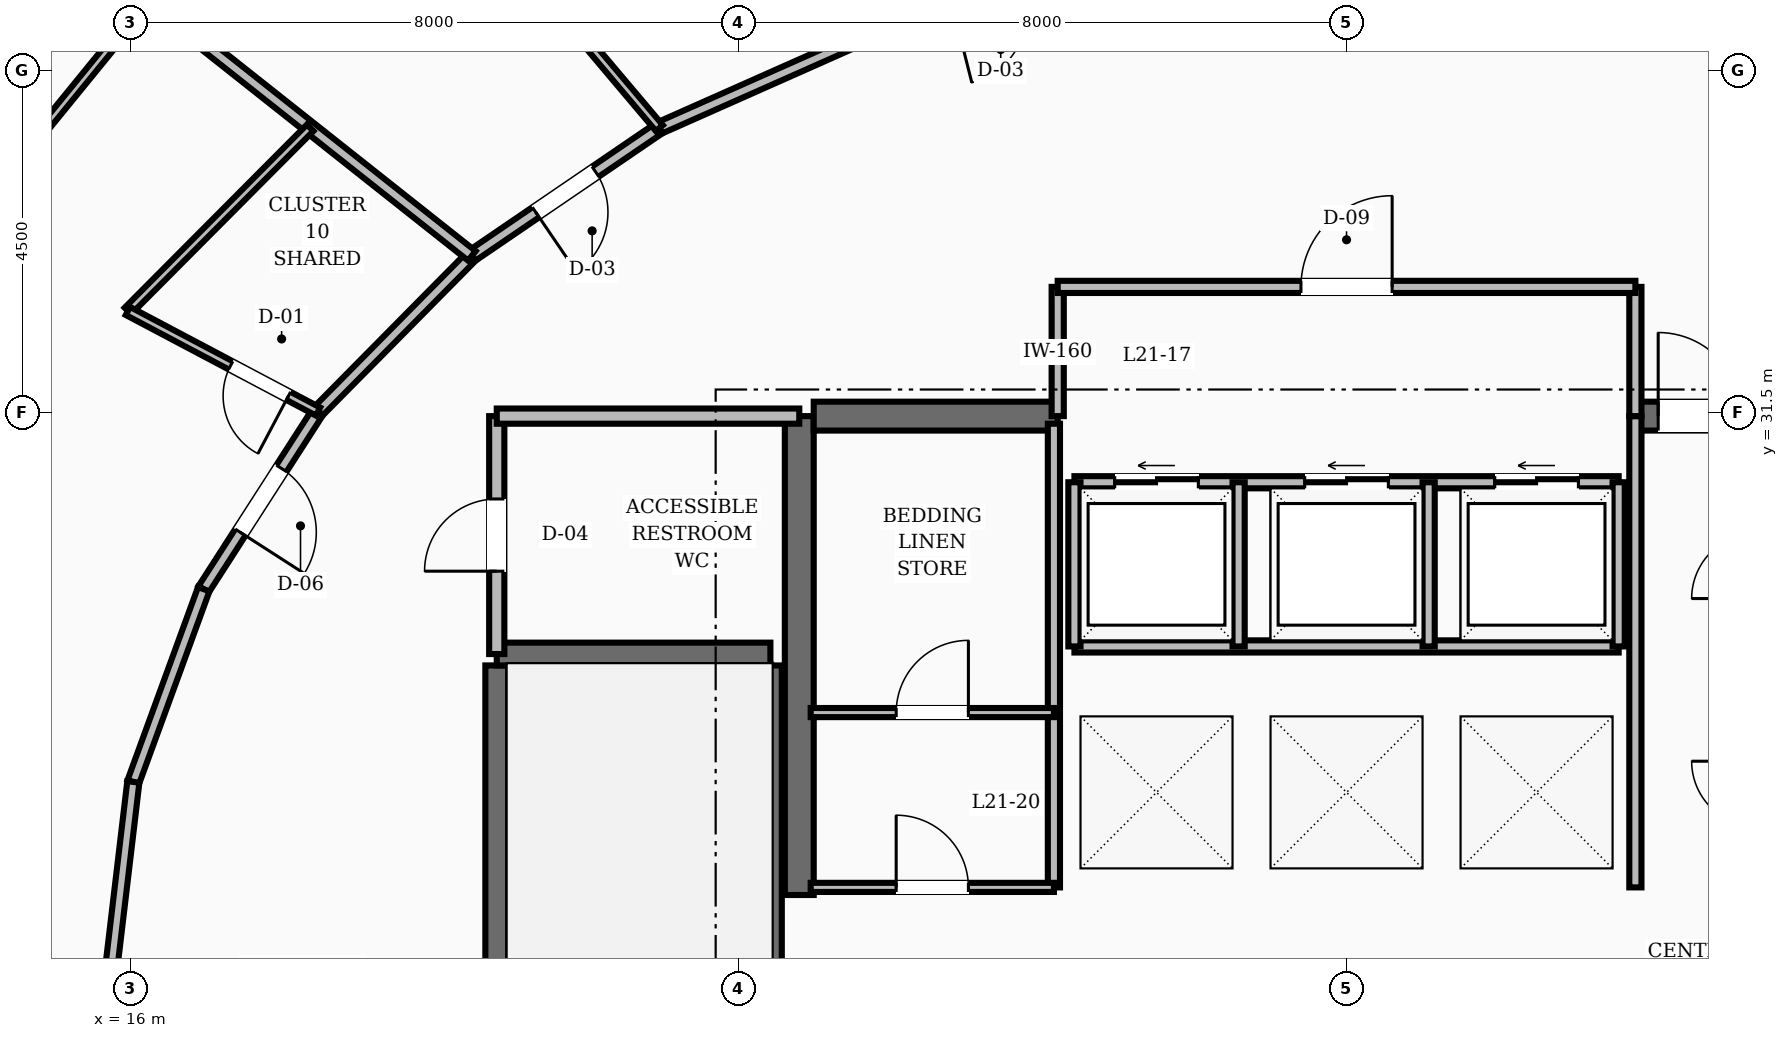
"""IFC4 building model, lengths in metres.
Left out: names, types, materials, properties, quantities, classifications, styles, units other than length and angle.
Written with IfcOpenShell. Run it as: python <this file> out.ifc"""

import sys

from ifc_helpers import new_model, si_unit, direction, frame, frame_2d, origin, place, context, subcontext, project, spatial, rectangle, extrude, element, fill, save


model = new_model("IFC4")
c1 = context("Model", 3, precision=1e-05, world=origin(), true_north=direction((0.0, 1.0)))
c2 = subcontext(c1, "Body", "Model", "MODEL_VIEW")
j1 = project(units=[si_unit("LENGTHUNIT", "METRE"), si_unit("PLANEANGLEUNIT", "RADIAN")], contexts=[c1])
p1 = place(None, origin())
s1 = spatial("IfcSite", under=j1, at=p1, CompositionType="ELEMENT")
p2 = place(p1, origin())
s2 = spatial("IfcBuilding", under=s1, at=p2, CompositionType="ELEMENT")
p3 = place(p2, frame((0.0, 0.0, 84.4)))
s3 = spatial("IfcBuildingStorey", under=s2, at=p3, CompositionType="ELEMENT", Elevation=84.4)
p4 = place(p3, frame((24.8, 25.15, 0.0), z_axis=(0.0, 0.0, 1.0), x_axis=(0.0, 1.0, 0.0)))
e1 = element("IfcWall", 1, at=p4, inside=s3, PredefinedType="SHEAR", context=c2, shape_type="SweptSolid", body=[
    extrude(rectangle(XDim=6.3, YDim=0.38, at=frame_2d((3.15, 0.0))), origin(), (0.0, 0.0, 1.0), 3.6),
])
p5 = place(p3, frame((24.99, 31.45, 0.0), z_axis=(0.0, 0.0, 1.0), x_axis=(1.0, 0.0, 0.0)))
e2 = element("IfcWall", 2, at=p5, inside=s3, PredefinedType="SHEAR", context=c2, shape_type="SweptSolid", body=[
    extrude(rectangle(XDim=3.21, YDim=0.38, at=frame_2d((1.605, 0.0))), origin(), (0.0, 0.0, 1.0), 3.6),
])
p6 = place(p3, frame((35.8, 31.45, 0.0), z_axis=(0.0, 0.0, 1.0), x_axis=(1.0, 0.0, 0.0)))
e3 = element("IfcWall", 3, at=p6, inside=s3, PredefinedType="SHEAR", context=c2, shape_type="SweptSolid", body=[
    extrude(rectangle(XDim=3.21, YDim=0.38, at=frame_2d((1.605, 0.0))), origin(), (0.0, 0.0, 1.0), 3.6),
])
p7 = place(p6, frame((0.3, 0.0, 0.0)))
e4 = element("IfcOpeningElement", 4, at=p7, cuts=e3, PredefinedType="OPENING", context=c2, shape_type="SweptSolid", body=[
    extrude(rectangle(XDim=1.1, YDim=2.1, at=frame_2d((0.55, 1.05))), frame((0.0, 0.2, 0.0), z_axis=(0.0, -1.0, 0.0), x_axis=(1.0, 0.0, 0.0)), (0.0, 0.0, 1.0), 0.4),
])
for number, where, z_axis, x_axis in (
    (5, (20.82, 19.43, 0.0), (0.0, 0.0, 1.0), (0.0, 1.0, 0.0)),
    (6, (24.42, 19.43, 0.0), (0.0, 0.0, 1.0), (0.0, 1.0, 0.0)),
):
    element("IfcWall", number, at=place(p3, frame(where, z_axis=z_axis, x_axis=x_axis)), inside=s3, PredefinedType="SHEAR", context=c2, shape_type="SweptSolid", body=[
        extrude(rectangle(XDim=8.74, YDim=0.3, at=frame_2d((4.37, 0.0))), origin(), (0.0, 0.0, 1.0), 3.6),
    ])
p8 = place(p3, frame((20.82, 28.32, 0.0), z_axis=(0.0, 0.0, 1.0), x_axis=(1.0, 0.0, 0.0)))
e7 = element("IfcWall", 7, at=p8, inside=s3, PredefinedType="SHEAR", context=c2, shape_type="SweptSolid", body=[
    extrude(rectangle(XDim=3.6, YDim=0.3, at=frame_2d((1.8, 0.0))), origin(), (0.0, 0.0, 1.0), 3.6),
])
p9 = place(p3, frame((20.82, 28.32, 0.0), z_axis=(0.0, 0.0, 1.0), x_axis=(0.0, 1.0, 0.0)))
e8 = element("IfcWall", 8, at=p9, inside=s3, PredefinedType="SOLIDWALL", context=c2, shape_type="SweptSolid", body=[
    extrude(rectangle(XDim=3.13, YDim=0.2, at=frame_2d((1.565, 0.0))), origin(), (0.0, 0.0, 1.0), 2.71),
])
p10 = place(p9, frame((1.09, 0.0, 0.0)))
e9 = element("IfcOpeningElement", 9, at=p10, cuts=e8, PredefinedType="OPENING", context=c2, shape_type="SweptSolid", body=[
    extrude(rectangle(XDim=0.95, YDim=2.1, at=frame_2d((0.475, 1.05))), frame((0.0, 0.11, 0.0), z_axis=(0.0, -1.0, 0.0), x_axis=(1.0, 0.0, 0.0)), (0.0, 0.0, 1.0), 0.22),
])
p11 = place(p3, frame((20.82, 31.45, 0.0), z_axis=(0.0, 0.0, 1.0), x_axis=(1.0, 0.0, 0.0)))
e10 = element("IfcWall", 10, at=p11, inside=s3, PredefinedType="SOLIDWALL", context=c2, shape_type="SweptSolid", body=[
    extrude(rectangle(XDim=3.98, YDim=0.2, at=frame_2d((1.99, 0.0))), origin(), (0.0, 0.0, 1.0), 2.71),
])
p12 = place(p3, frame((35.8, 25.25, 0.0), z_axis=(0.0, 0.0, 1.0), x_axis=(0.0, 1.0, 0.0)))
e11 = element("IfcWall", 11, at=p12, inside=s3, PredefinedType="SOLIDWALL", context=c2, shape_type="SweptSolid", body=[
    extrude(rectangle(XDim=6.2, YDim=0.16, at=frame_2d((3.1, 0.0))), origin(), (0.0, 0.0, 1.0), 2.71),
])
p13 = place(p3, frame((28.42, 30.58, 0.0), z_axis=(0.0, 0.0, 1.0), x_axis=(1.0, 0.0, 0.0)))
e12 = element("IfcWall", 12, at=p13, inside=s3, PredefinedType="SOLIDWALL", context=c2, shape_type="SweptSolid", body=[
    extrude(rectangle(XDim=7.16, YDim=0.16, at=frame_2d((3.58, 0.0))), origin(), (0.0, 0.0, 1.0), 2.71),
])
p14 = place(p13, frame((0.53, 0.0, 0.0)))
e13 = element("IfcOpeningElement", 13, at=p14, cuts=e12, PredefinedType="OPENING", context=c2, shape_type="SweptSolid", body=[
    extrude(rectangle(XDim=1.1, YDim=2.15, at=frame_2d((0.55, 1.075))), frame((0.0, 0.09, 0.0), z_axis=(0.0, -1.0, 0.0), x_axis=(1.0, 0.0, 0.0)), (0.0, 0.0, 1.0), 0.18),
])
p15 = place(p13, frame((3.03, 0.0, 0.0)))
e14 = element("IfcOpeningElement", 14, at=p15, cuts=e12, PredefinedType="OPENING", context=c2, shape_type="SweptSolid", body=[
    extrude(rectangle(XDim=1.1, YDim=2.15, at=frame_2d((0.55, 1.075))), frame((0.0, 0.09, 0.0), z_axis=(0.0, -1.0, 0.0), x_axis=(1.0, 0.0, 0.0)), (0.0, 0.0, 1.0), 0.18),
])
p16 = place(p13, frame((5.53, 0.0, 0.0)))
e15 = element("IfcOpeningElement", 15, at=p16, cuts=e12, PredefinedType="OPENING", context=c2, shape_type="SweptSolid", body=[
    extrude(rectangle(XDim=1.1, YDim=2.15, at=frame_2d((0.55, 1.075))), frame((0.0, 0.09, 0.0), z_axis=(0.0, -1.0, 0.0), x_axis=(1.0, 0.0, 0.0)), (0.0, 0.0, 1.0), 0.18),
])
p17 = place(p3, frame((28.42, 28.42, 0.0), z_axis=(0.0, 0.0, 1.0), x_axis=(1.0, 0.0, 0.0)))
e16 = element("IfcWall", 16, at=p17, inside=s3, PredefinedType="SOLIDWALL", context=c2, shape_type="SweptSolid", body=[
    extrude(rectangle(XDim=7.16, YDim=0.16, at=frame_2d((3.58, 0.0))), origin(), (0.0, 0.0, 1.0), 2.71),
])
for number, where, z_axis, x_axis in (
    (17, (28.42, 28.42, 0.0), (0.0, 0.0, 1.0), (0.0, 1.0, 0.0)),
    (18, (30.58, 28.42, 0.0), (0.0, 0.0, 1.0), (0.0, 1.0, 0.0)),
    (19, (33.08, 28.42, 0.0), (0.0, 0.0, 1.0), (0.0, 1.0, 0.0)),
    (20, (35.58, 28.42, 0.0), (0.0, 0.0, 1.0), (0.0, 1.0, 0.0)),
):
    element("IfcWall", number, at=place(p3, frame(where, z_axis=z_axis, x_axis=x_axis)), inside=s3, PredefinedType="SOLIDWALL", context=c2, shape_type="SweptSolid", body=[
        extrude(rectangle(XDim=2.16, YDim=0.16, at=frame_2d((1.08, 0.0))), origin(), (0.0, 0.0, 1.0), 2.71),
    ])
for number, where, z_axis, x_axis in (
    (21, (28.2, 31.45, 0.0), (0.0, 0.0, 1.0), (0.0, 1.0, 0.0)),
    (22, (35.8, 31.45, 0.0), (0.0, 0.0, 1.0), (0.0, 1.0, 0.0)),
):
    element("IfcWall", number, at=place(p3, frame(where, z_axis=z_axis, x_axis=x_axis)), inside=s3, PredefinedType="SOLIDWALL", context=c2, shape_type="SweptSolid", body=[
        extrude(rectangle(XDim=1.7, YDim=0.16, at=frame_2d((0.85, 0.0))), origin(), (0.0, 0.0, 1.0), 2.71),
    ])
p18 = place(p3, frame((28.2, 33.15, 0.0), z_axis=(0.0, 0.0, 1.0), x_axis=(1.0, 0.0, 0.0)))
e23 = element("IfcWall", 23, at=p18, inside=s3, PredefinedType="SOLIDWALL", context=c2, shape_type="SweptSolid", body=[
    extrude(rectangle(XDim=7.6, YDim=0.16, at=frame_2d((3.8, 0.0))), origin(), (0.0, 0.0, 1.0), 2.71),
])
p19 = place(p18, frame((3.2, 0.0, 0.0)))
e24 = element("IfcOpeningElement", 24, at=p19, cuts=e23, PredefinedType="OPENING", context=c2, shape_type="SweptSolid", body=[
    extrude(rectangle(XDim=1.2, YDim=2.1, at=frame_2d((0.6, 1.05))), frame((0.0, 0.09, 0.0), z_axis=(0.0, -1.0, 0.0), x_axis=(1.0, 0.0, 0.0)), (0.0, 0.0, 1.0), 0.18),
])
p20 = place(p3, frame((28.15, 25.25, 0.0), z_axis=(0.0, 0.0, 1.0), x_axis=(0.0, 1.0, 0.0)))
e25 = element("IfcWall", 25, at=p20, inside=s3, PredefinedType="SOLIDWALL", context=c2, shape_type="SweptSolid", body=[
    extrude(rectangle(XDim=6.1, YDim=0.16, at=frame_2d((3.05, 0.0))), origin(), (0.0, 0.0, 1.0), 2.71),
])
p21 = place(p3, frame((24.95, 25.25, 0.0), z_axis=(0.0, 0.0, 1.0), x_axis=(1.0, 0.0, 0.0)))
e26 = element("IfcWall", 26, at=p21, inside=s3, PredefinedType="PARTITIONING", context=c2, shape_type="SweptSolid", body=[
    extrude(rectangle(XDim=3.2, YDim=0.12, at=frame_2d((1.6, 0.0))), origin(), (0.0, 0.0, 1.0), 2.71),
])
p22 = place(p21, frame((1.125, 0.0, 0.0)))
e27 = element("IfcOpeningElement", 27, at=p22, cuts=e26, PredefinedType="OPENING", context=c2, shape_type="SweptSolid", body=[
    extrude(rectangle(XDim=0.95, YDim=2.1, at=frame_2d((0.475, 1.05))), frame((0.0, 0.07, 0.0), z_axis=(0.0, -1.0, 0.0), x_axis=(1.0, 0.0, 0.0)), (0.0, 0.0, 1.0), 0.14),
])
p23 = place(p3, frame((24.95, 27.55, 0.0), z_axis=(0.0, 0.0, 1.0), x_axis=(1.0, 0.0, 0.0)))
e28 = element("IfcWall", 28, at=p23, inside=s3, PredefinedType="PARTITIONING", context=c2, shape_type="SweptSolid", body=[
    extrude(rectangle(XDim=3.2, YDim=0.12, at=frame_2d((1.6, 0.0))), origin(), (0.0, 0.0, 1.0), 2.71),
])
p24 = place(p23, frame((1.125, 0.0, 0.0)))
e29 = element("IfcOpeningElement", 29, at=p24, cuts=e28, PredefinedType="OPENING", context=c2, shape_type="SweptSolid", body=[
    extrude(rectangle(XDim=0.95, YDim=2.1, at=frame_2d((0.475, 1.05))), frame((0.0, 0.07, 0.0), z_axis=(0.0, -1.0, 0.0), x_axis=(1.0, 0.0, 0.0)), (0.0, 0.0, 1.0), 0.14),
])
p25 = place(p3, frame((25.772, 36.489, 0.0), z_axis=(0.0, 0.0, 1.0), x_axis=(-0.913952123493, -0.405822024984, 0.0)))
e30 = element("IfcWall", 30, at=p25, inside=s3, PredefinedType="SOLIDWALL", context=c2, shape_type="SweptSolid", body=[
    extrude(rectangle(XDim=3.078, YDim=0.16, at=frame_2d((1.539, 0.0))), origin(), (0.0, 0.0, 1.0), 2.71),
])
p26 = place(p3, frame((22.959, 35.24, 0.0), z_axis=(0.0, 0.0, 1.0), x_axis=(-0.826293096206, -0.56324037423, 0.0)))
e31 = element("IfcWall", 31, at=p26, inside=s3, PredefinedType="SOLIDWALL", context=c2, shape_type="SweptSolid", body=[
    extrude(rectangle(XDim=2.985, YDim=0.16, at=frame_2d((1.492, 0.0))), origin(), (0.0, 0.0, 1.0), 2.71),
])
p27 = place(p26, frame((1.017, 0.0, 0.0)))
e32 = element("IfcOpeningElement", 32, at=p27, cuts=e31, PredefinedType="OPENING", context=c2, shape_type="SweptSolid", body=[
    extrude(rectangle(XDim=0.95, YDim=2.1, at=frame_2d((0.475, 1.05))), frame((0.0, 0.09, 0.0), z_axis=(0.0, -1.0, 0.0), x_axis=(1.0, 0.0, 0.0)), (0.0, 0.0, 1.0), 0.18),
])
p28 = place(p3, frame((20.492, 33.559, 0.0), z_axis=(0.0, 0.0, 1.0), x_axis=(-0.702811997, -0.711375636969, 0.0)))
e33 = element("IfcWall", 33, at=p28, inside=s3, PredefinedType="SOLIDWALL", context=c2, shape_type="SweptSolid", body=[
    extrude(rectangle(XDim=2.879, YDim=0.16, at=frame_2d((1.44, 0.0))), origin(), (0.0, 0.0, 1.0), 2.71),
])
p29 = place(p3, frame((18.469, 31.51, 0.0), z_axis=(0.0, 0.0, 1.0), x_axis=(-0.541126045017, -0.840941498206, 0.0)))
e34 = element("IfcWall", 34, at=p29, inside=s3, PredefinedType="SOLIDWALL", context=c2, shape_type="SweptSolid", body=[
    extrude(rectangle(XDim=2.779, YDim=0.16, at=frame_2d((1.39, 0.0))), origin(), (0.0, 0.0, 1.0), 2.71),
])
p30 = place(p29, frame((0.89, 0.0, 0.0)))
e35 = element("IfcOpeningElement", 35, at=p30, cuts=e34, PredefinedType="OPENING", context=c2, shape_type="SweptSolid", body=[
    extrude(rectangle(XDim=1.0, YDim=2.1, at=frame_2d((0.5, 1.05))), frame((0.0, 0.09, 0.0), z_axis=(0.0, -1.0, 0.0), x_axis=(1.0, 0.0, 0.0)), (0.0, 0.0, 1.0), 0.18),
])
p31 = place(p3, frame((16.965, 29.173, 0.0), z_axis=(0.0, 0.0, 1.0), x_axis=(-0.343013437329, -0.939330496583, 0.0)))
e36 = element("IfcWall", 36, at=p31, inside=s3, PredefinedType="SOLIDWALL", context=c2, shape_type="SweptSolid", body=[
    extrude(rectangle(XDim=2.7, YDim=0.16, at=frame_2d((1.35, 0.0))), origin(), (0.0, 0.0, 1.0), 2.71),
])
p32 = place(p3, frame((16.039, 26.637, 0.0), z_axis=(0.0, 0.0, 1.0), x_axis=(-0.117763961213, -0.99304161516, 0.0)))
e37 = element("IfcWall", 37, at=p32, inside=s3, PredefinedType="SOLIDWALL", context=c2, shape_type="SweptSolid", body=[
    extrude(rectangle(XDim=2.656, YDim=0.16, at=frame_2d((1.328, 0.0))), origin(), (0.0, 0.0, 1.0), 2.71),
])
p33 = place(p3, frame((22.959, 35.24, 0.0), z_axis=(0.0, 0.0, 1.0), x_axis=(-0.644964696284, 0.764212366131, 0.0)))
e38 = element("IfcWall", 38, at=p33, inside=s3, PredefinedType="PARTITIONING", context=c2, shape_type="SweptSolid", body=[
    extrude(rectangle(XDim=3.517, YDim=0.12, at=frame_2d((1.759, 0.0))), origin(), (0.0, 0.0, 1.0), 2.71),
])
p34 = place(p3, frame((20.492, 33.559, 0.0), z_axis=(0.0, 0.0, 1.0), x_axis=(-0.784008851618, 0.620749644047, 0.0)))
e39 = element("IfcWall", 39, at=p34, inside=s3, PredefinedType="SOLIDWALL", context=c2, shape_type="SweptSolid", body=[
    extrude(rectangle(XDim=9.641, YDim=0.16, at=frame_2d((4.82, 0.0))), origin(), (0.0, 0.0, 1.0), 2.71),
])
p35 = place(p3, frame((18.365, 35.243, 0.0), z_axis=(0.0, 0.0, 1.0), x_axis=(-0.705416994653, -0.708792539221, 0.0)))
e40 = element("IfcWall", 40, at=p35, inside=s3, PredefinedType="PARTITIONING", context=c2, shape_type="SweptSolid", body=[
    extrude(rectangle(XDim=3.399, YDim=0.12, at=frame_2d((1.7, 0.0))), origin(), (0.0, 0.0, 1.0), 2.71),
])
p36 = place(p3, frame((18.469, 31.51, 0.0), z_axis=(0.0, 0.0, 1.0), x_axis=(-0.883962018059, 0.467558713563, 0.0)))
e41 = element("IfcWall", 41, at=p36, inside=s3, PredefinedType="PARTITIONING", context=c2, shape_type="SweptSolid", body=[
    extrude(rectangle(XDim=2.83, YDim=0.12, at=frame_2d((1.415, 0.0))), origin(), (0.0, 0.0, 1.0), 2.71),
])
p37 = place(p36, frame((0.44, 0.0, 0.0)))
e42 = element("IfcOpeningElement", 42, at=p37, cuts=e41, PredefinedType="OPENING", context=c2, shape_type="SweptSolid", body=[
    extrude(rectangle(XDim=0.86, YDim=2.1, at=frame_2d((0.43, 1.05))), frame((0.0, 0.07, 0.0), z_axis=(0.0, -1.0, 0.0), x_axis=(1.0, 0.0, 0.0)), (0.0, 0.0, 1.0), 0.14),
])
p38 = place(p3, frame((16.238, 36.927, 0.0), z_axis=(0.0, 0.0, 1.0), x_axis=(-0.631616835391, -0.7752807061, 0.0)))
e43 = element("IfcWall", 43, at=p38, inside=s3, PredefinedType="PARTITIONING", context=c2, shape_type="SweptSolid", body=[
    extrude(rectangle(XDim=7.651, YDim=0.12, at=frame_2d((3.825, 0.0))), origin(), (0.0, 0.0, 1.0), 2.71),
])
p39 = place(p38, frame((4.631, 0.0, 0.0)))
e44 = element("IfcOpeningElement", 44, at=p39, cuts=e43, PredefinedType="OPENING", context=c2, shape_type="SweptSolid", body=[
    extrude(rectangle(XDim=0.95, YDim=2.1, at=frame_2d((0.475, 1.05))), frame((0.0, 0.07, 0.0), z_axis=(0.0, -1.0, 0.0), x_axis=(1.0, 0.0, 0.0)), (0.0, 0.0, 1.0), 0.14),
])
p40 = place(p10, origin())
e45 = element("IfcDoor", 45, at=p40, inside=s3, OperationType="SINGLE_SWING_LEFT", PredefinedType="DOOR", context=c2, shape_type="SweptSolid", body=[
    extrude(rectangle(XDim=0.95, YDim=2.1, at=frame_2d((0.475, 1.05))), frame((0.0, 0.025, 0.0), z_axis=(0.0, -1.0, 0.0), x_axis=(1.0, 0.0, 0.0)), (0.0, 0.0, 1.0), 0.05),
])
fill(e9, e45)
p41 = place(p7, origin())
e46 = element("IfcDoor", 46, at=p41, inside=s3, OperationType="SINGLE_SWING_LEFT", PredefinedType="DOOR", context=c2, shape_type="SweptSolid", body=[
    extrude(rectangle(XDim=1.1, YDim=2.1, at=frame_2d((0.55, 1.05))), frame((0.0, 0.025, 0.0), z_axis=(0.0, -1.0, 0.0), x_axis=(1.0, 0.0, 0.0)), (0.0, 0.0, 1.0), 0.05),
])
fill(e4, e46)
p42 = place(p14, origin())
e47 = element("IfcDoor", 47, at=p42, inside=s3, OperationType="SLIDING_TO_LEFT", PredefinedType="DOOR", context=c2, shape_type="SweptSolid", body=[
    extrude(rectangle(XDim=1.1, YDim=2.15, at=frame_2d((0.55, 1.075))), frame((0.0, 0.025, 0.0), z_axis=(0.0, -1.0, 0.0), x_axis=(1.0, 0.0, 0.0)), (0.0, 0.0, 1.0), 0.05),
])
fill(e13, e47)
p43 = place(p15, origin())
e48 = element("IfcDoor", 48, at=p43, inside=s3, OperationType="SLIDING_TO_LEFT", PredefinedType="DOOR", context=c2, shape_type="SweptSolid", body=[
    extrude(rectangle(XDim=1.1, YDim=2.15, at=frame_2d((0.55, 1.075))), frame((0.0, 0.025, 0.0), z_axis=(0.0, -1.0, 0.0), x_axis=(1.0, 0.0, 0.0)), (0.0, 0.0, 1.0), 0.05),
])
fill(e14, e48)
p44 = place(p16, origin())
e49 = element("IfcDoor", 49, at=p44, inside=s3, OperationType="SLIDING_TO_LEFT", PredefinedType="DOOR", context=c2, shape_type="SweptSolid", body=[
    extrude(rectangle(XDim=1.1, YDim=2.15, at=frame_2d((0.55, 1.075))), frame((0.0, 0.025, 0.0), z_axis=(0.0, -1.0, 0.0), x_axis=(1.0, 0.0, 0.0)), (0.0, 0.0, 1.0), 0.05),
])
fill(e15, e49)
p45 = place(p19, origin())
e50 = element("IfcDoor", 50, at=p45, inside=s3, OperationType="SINGLE_SWING_RIGHT", PredefinedType="DOOR", context=c2, shape_type="SweptSolid", body=[
    extrude(rectangle(XDim=1.2, YDim=2.1, at=frame_2d((0.6, 1.05))), frame((0.0, 0.025, 0.0), z_axis=(0.0, -1.0, 0.0), x_axis=(1.0, 0.0, 0.0)), (0.0, 0.0, 1.0), 0.05),
])
fill(e24, e50)
p46 = place(p22, origin())
e51 = element("IfcDoor", 51, at=p46, inside=s3, OperationType="SINGLE_SWING_LEFT", PredefinedType="DOOR", context=c2, shape_type="SweptSolid", body=[
    extrude(rectangle(XDim=0.95, YDim=2.1, at=frame_2d((0.475, 1.05))), frame((0.0, 0.025, 0.0), z_axis=(0.0, -1.0, 0.0), x_axis=(1.0, 0.0, 0.0)), (0.0, 0.0, 1.0), 0.05),
])
fill(e27, e51)
p47 = place(p24, origin())
e52 = element("IfcDoor", 52, at=p47, inside=s3, OperationType="SINGLE_SWING_RIGHT", PredefinedType="DOOR", context=c2, shape_type="SweptSolid", body=[
    extrude(rectangle(XDim=0.95, YDim=2.1, at=frame_2d((0.475, 1.05))), frame((0.0, 0.025, 0.0), z_axis=(0.0, -1.0, 0.0), x_axis=(1.0, 0.0, 0.0)), (0.0, 0.0, 1.0), 0.05),
])
fill(e29, e52)
p48 = place(p27, origin())
e53 = element("IfcDoor", 53, at=p48, inside=s3, OperationType="SINGLE_SWING_RIGHT", PredefinedType="DOOR", context=c2, shape_type="SweptSolid", body=[
    extrude(rectangle(XDim=0.95, YDim=2.1, at=frame_2d((0.475, 1.05))), frame((0.0, 0.025, 0.0), z_axis=(0.0, -1.0, 0.0), x_axis=(1.0, 0.0, 0.0)), (0.0, 0.0, 1.0), 0.05),
])
fill(e32, e53)
p49 = place(p37, origin())
e54 = element("IfcDoor", 54, at=p49, inside=s3, OperationType="SINGLE_SWING_LEFT", PredefinedType="DOOR", context=c2, shape_type="SweptSolid", body=[
    extrude(rectangle(XDim=0.86, YDim=2.1, at=frame_2d((0.43, 1.05))), frame((0.0, 0.025, 0.0), z_axis=(0.0, -1.0, 0.0), x_axis=(1.0, 0.0, 0.0)), (0.0, 0.0, 1.0), 0.05),
])
fill(e42, e54)
p50 = place(p30, origin())
e55 = element("IfcDoor", 55, at=p50, inside=s3, OperationType="SINGLE_SWING_RIGHT", PredefinedType="DOOR", context=c2, shape_type="SweptSolid", body=[
    extrude(rectangle(XDim=1.0, YDim=2.1, at=frame_2d((0.5, 1.05))), frame((0.0, 0.025, 0.0), z_axis=(0.0, -1.0, 0.0), x_axis=(1.0, 0.0, 0.0)), (0.0, 0.0, 1.0), 0.05),
])
fill(e35, e55)
save(model, sys.argv[1])
